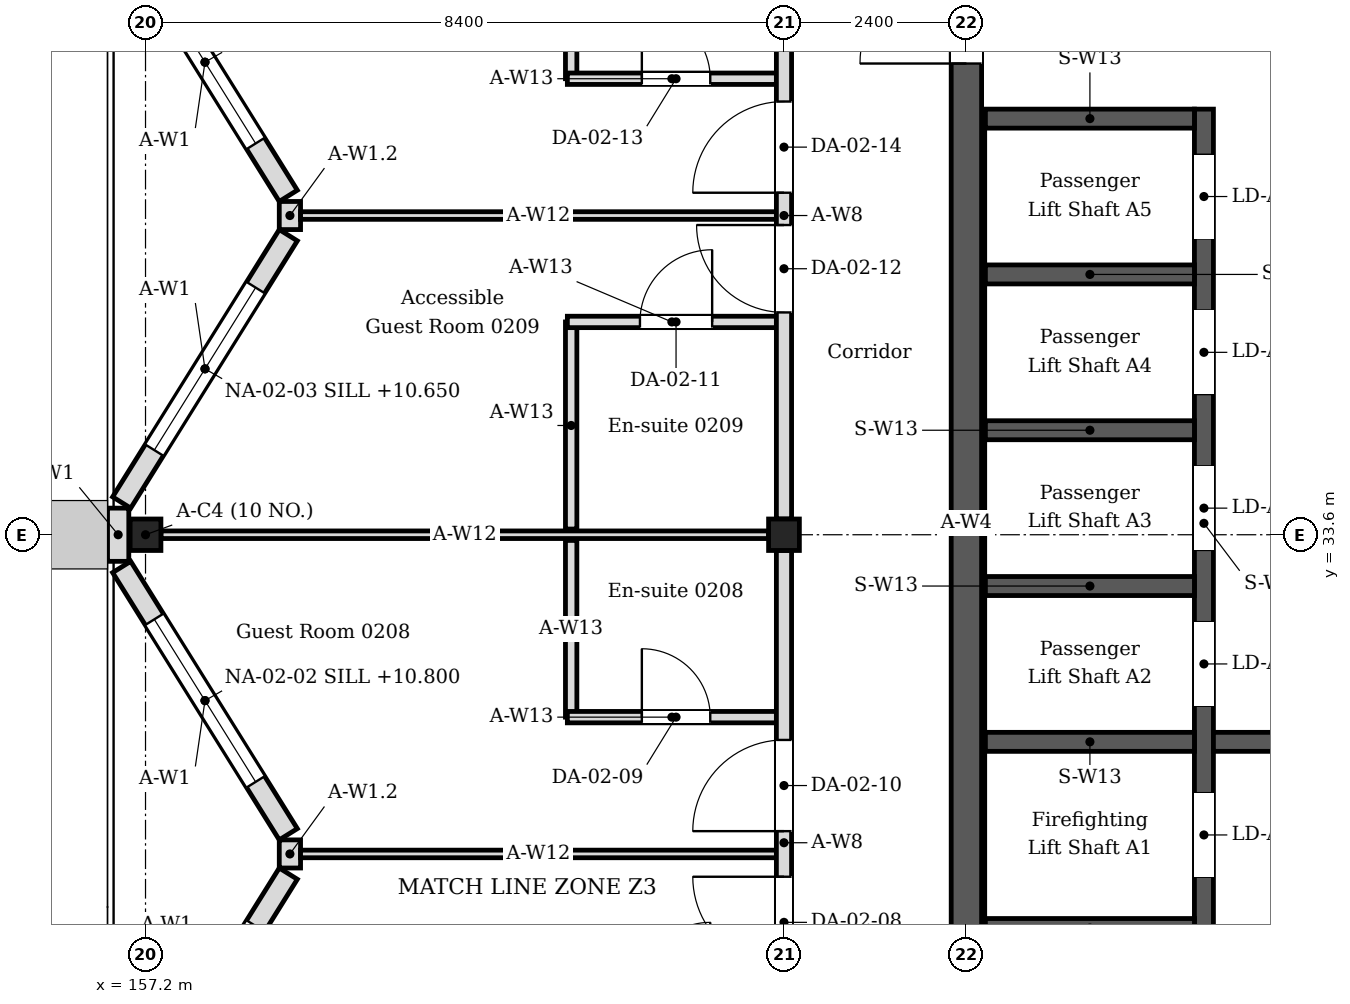
"""IFC4 building model, lengths in metres.
Left out: names, types, materials, properties, quantities, classifications, styles, units other than length and angle.
Written with IfcOpenShell. Run it as: python <this file> out.ifc"""

import sys

from ifc_helpers import new_model, si_unit, direction, frame, frame_2d, origin, origin_2d, place, context, subcontext, project, spatial, rectangle, i_section, extrude, element, fill, save


model = new_model("IFC4")
c1 = context("Model", 3, precision=1e-05, world=origin(), true_north=direction((0.0, 1.0)))
c2 = subcontext(c1, "Body", "Model", "MODEL_VIEW")
j1 = project(units=[si_unit("LENGTHUNIT", "METRE"), si_unit("PLANEANGLEUNIT", "RADIAN")], contexts=[c1])
p1 = place(None, origin())
s1 = spatial("IfcSite", under=j1, at=p1, CompositionType="ELEMENT")
p2 = place(p1, origin())
s2 = spatial("IfcBuilding", under=s1, at=p2, CompositionType="ELEMENT")
p3 = place(p2, frame((0.0, 0.0, 10.2)))
s3 = spatial("IfcBuildingStorey", under=s2, at=p3, CompositionType="ELEMENT", Elevation=10.2)
for number, where, z_axis, x_axis in (
    (1, (157.2, 33.6, 0.0), (0.0, 0.0, 1.0), (1.0, 0.0, 0.0)),
    (2, (165.6, 33.6, 0.0), (0.0, 0.0, 1.0), (1.0, 0.0, 0.0)),
):
    element("IfcColumn", number, at=place(p3, frame(where, z_axis=z_axis, x_axis=x_axis)), inside=s3, PredefinedType="COLUMN", context=c2, shape_type="SweptSolid", body=[
        extrude(i_section(OverallWidth=0.405, OverallDepth=0.414, WebThickness=0.018, FlangeThickness=0.028, FilletRadius=0.022, at=origin_2d()), origin(), (0.0, 0.0, 1.0), 4.2),
    ])
p4 = place(p3, frame((168.0, 25.4, 0.0), z_axis=(0.0, 0.0, 1.0), x_axis=(0.0, 1.0, 0.0)))
e3 = element("IfcWall", 3, at=p4, inside=s3, PredefinedType="SOLIDWALL", context=c2, shape_type="SweptSolid", body=[
    extrude(rectangle(XDim=16.4, YDim=0.4, at=frame_2d((8.2, 0.0))), origin(), (0.0, 0.0, 1.0), 4.05),
])
p5 = place(p4, frame((1.0, 0.0, 0.0)))
e4 = element("IfcOpeningElement", 4, at=p5, cuts=e3, PredefinedType="OPENING", context=c2, shape_type="SweptSolid", body=[
    extrude(rectangle(XDim=1.0, YDim=2.1, at=frame_2d((0.5, 1.05))), frame((0.0, 0.21, 0.0), z_axis=(0.0, -1.0, 0.0), x_axis=(1.0, 0.0, 0.0)), (0.0, 0.0, 1.0), 0.42),
])
p6 = place(p4, frame((14.4, 0.0, 0.0)))
e5 = element("IfcOpeningElement", 5, at=p6, cuts=e3, PredefinedType="OPENING", context=c2, shape_type="SweptSolid", body=[
    extrude(rectangle(XDim=1.4, YDim=2.1, at=frame_2d((0.7, 1.05))), frame((0.0, 0.21, 0.0), z_axis=(0.0, -1.0, 0.0), x_axis=(1.0, 0.0, 0.0)), (0.0, 0.0, 1.0), 0.42),
])
p7 = place(p3, frame((156.886, 25.624, 0.0), z_axis=(0.0, 0.0, 1.0), x_axis=(0.528992500338, 0.848626498871, 0.0)))
e6 = element("IfcWall", 6, at=p7, inside=s3, PredefinedType="SOLIDWALL", context=c2, shape_type="SweptSolid", body=[
    extrude(rectangle(XDim=4.145, YDim=0.28, at=frame_2d((2.072, 0.0))), origin(), (0.0, 0.0, 1.0), 4.05),
])
p8 = place(p7, frame((0.812, 0.0, 0.6)))
e7 = element("IfcOpeningElement", 7, at=p8, cuts=e6, PredefinedType="OPENING", context=c2, shape_type="SweptSolid", body=[
    extrude(rectangle(XDim=2.52, YDim=2.4, at=frame_2d((1.26, 1.2))), frame((0.0, 0.15, 0.0), z_axis=(0.0, -1.0, 0.0), x_axis=(1.0, 0.0, 0.0)), (0.0, 0.0, 1.0), 0.3),
])
p9 = place(p3, frame((159.079, 29.659, 0.0), z_axis=(0.0, 0.0, 1.0), x_axis=(-0.529018946142, 0.848610013271, 0.0)))
e8 = element("IfcWall", 8, at=p9, inside=s3, PredefinedType="SOLIDWALL", context=c2, shape_type="SweptSolid", body=[
    extrude(rectangle(XDim=4.144, YDim=0.28, at=frame_2d((2.072, 0.0))), origin(), (0.0, 0.0, 1.0), 4.05),
])
p10 = place(p9, frame((0.812, 0.0, 0.6)))
e9 = element("IfcOpeningElement", 9, at=p10, cuts=e8, PredefinedType="OPENING", context=c2, shape_type="SweptSolid", body=[
    extrude(rectangle(XDim=2.52, YDim=2.4, at=frame_2d((1.26, 1.2))), frame((0.0, 0.15, 0.0), z_axis=(0.0, -1.0, 0.0), x_axis=(1.0, 0.0, 0.0)), (0.0, 0.0, 1.0), 0.3),
])
p11 = place(p3, frame((159.1, 29.215, 0.0), z_axis=(0.0, 0.0, 1.0), x_axis=(0.0, 1.0, 0.0)))
e10 = element("IfcWall", 10, at=p11, inside=s3, PredefinedType="SOLIDWALL", context=c2, shape_type="SweptSolid", body=[
    extrude(rectangle(XDim=0.37, YDim=0.28, at=frame_2d((0.185, 0.0))), origin(), (0.0, 0.0, 1.0), 3.604),
])
p12 = place(p3, frame((156.84, 33.25, 0.0), z_axis=(0.0, 0.0, 1.0), x_axis=(0.0, 1.0, 0.0)))
e11 = element("IfcWall", 11, at=p12, inside=s3, PredefinedType="SOLIDWALL", context=c2, shape_type="SweptSolid", body=[
    extrude(rectangle(XDim=0.7, YDim=0.28, at=frame_2d((0.35, 0.0))), origin(), (0.0, 0.0, 1.0), 4.05),
])
p13 = place(p3, frame((156.886, 34.024, 0.0), z_axis=(0.0, 0.0, 1.0), x_axis=(0.529018946142, 0.848610013271, 0.0)))
e12 = element("IfcWall", 12, at=p13, inside=s3, PredefinedType="SOLIDWALL", context=c2, shape_type="SweptSolid", body=[
    extrude(rectangle(XDim=4.144, YDim=0.28, at=frame_2d((2.072, 0.0))), origin(), (0.0, 0.0, 1.0), 4.05),
])
p14 = place(p13, frame((0.812, 0.0, 0.45)))
e13 = element("IfcOpeningElement", 13, at=p14, cuts=e12, PredefinedType="OPENING", context=c2, shape_type="SweptSolid", body=[
    extrude(rectangle(XDim=2.52, YDim=2.1, at=frame_2d((1.26, 1.05))), frame((0.0, 0.15, 0.0), z_axis=(0.0, -1.0, 0.0), x_axis=(1.0, 0.0, 0.0)), (0.0, 0.0, 1.0), 0.3),
])
p15 = place(p3, frame((159.079, 38.059, 0.0), z_axis=(0.0, 0.0, 1.0), x_axis=(-0.529018946142, 0.848610013271, 0.0)))
e14 = element("IfcWall", 14, at=p15, inside=s3, PredefinedType="SOLIDWALL", context=c2, shape_type="SweptSolid", body=[
    extrude(rectangle(XDim=4.144, YDim=0.28, at=frame_2d((2.072, 0.0))), origin(), (0.0, 0.0, 1.0), 4.05),
])
p16 = place(p15, frame((0.812, 0.0, 0.6)))
e15 = element("IfcOpeningElement", 15, at=p16, cuts=e14, PredefinedType="OPENING", context=c2, shape_type="SweptSolid", body=[
    extrude(rectangle(XDim=2.52, YDim=2.4, at=frame_2d((1.26, 1.2))), frame((0.0, 0.15, 0.0), z_axis=(0.0, -1.0, 0.0), x_axis=(1.0, 0.0, 0.0)), (0.0, 0.0, 1.0), 0.3),
])
p17 = place(p3, frame((159.1, 37.615, 0.0), z_axis=(0.0, 0.0, 1.0), x_axis=(0.0, 1.0, 0.0)))
e16 = element("IfcWall", 16, at=p17, inside=s3, PredefinedType="SOLIDWALL", context=c2, shape_type="SweptSolid", body=[
    extrude(rectangle(XDim=0.37, YDim=0.28, at=frame_2d((0.185, 0.0))), origin(), (0.0, 0.0, 1.0), 3.604),
])
p18 = place(p3, frame((162.8, 31.2, 0.0), z_axis=(0.0, 0.0, 1.0), x_axis=(0.0, 1.0, 0.0)))
e17 = element("IfcWall", 17, at=p18, inside=s3, PredefinedType="PARTITIONING", context=c2, shape_type="SweptSolid", body=[
    extrude(rectangle(XDim=2.325, YDim=0.15, at=frame_2d((1.163, 0.0))), origin(), (0.0, 0.0, 1.0), 4.05),
])
p19 = place(p3, frame((162.75, 31.2, 0.0), z_axis=(0.0, 0.0, 1.0), x_axis=(1.0, 0.0, 0.0)))
e18 = element("IfcWall", 18, at=p19, inside=s3, PredefinedType="PARTITIONING", context=c2, shape_type="SweptSolid", body=[
    extrude(rectangle(XDim=2.75, YDim=0.15, at=frame_2d((1.375, 0.0))), origin(), (0.0, 0.0, 1.0), 4.05),
])
p20 = place(p19, frame((0.98, 0.0, 0.0)))
e19 = element("IfcOpeningElement", 19, at=p20, cuts=e18, PredefinedType="OPENING", context=c2, shape_type="SweptSolid", body=[
    extrude(rectangle(XDim=0.9, YDim=2.1, at=frame_2d((0.45, 1.05))), frame((0.0, 0.085, 0.0), z_axis=(0.0, -1.0, 0.0), x_axis=(1.0, 0.0, 0.0)), (0.0, 0.0, 1.0), 0.17),
])
p21 = place(p3, frame((162.8, 33.675, 0.0), z_axis=(0.0, 0.0, 1.0), x_axis=(0.0, 1.0, 0.0)))
e20 = element("IfcWall", 20, at=p21, inside=s3, PredefinedType="PARTITIONING", context=c2, shape_type="SweptSolid", body=[
    extrude(rectangle(XDim=2.725, YDim=0.15, at=frame_2d((1.362, 0.0))), origin(), (0.0, 0.0, 1.0), 4.05),
])
p22 = place(p3, frame((162.75, 36.4, 0.0), z_axis=(0.0, 0.0, 1.0), x_axis=(1.0, 0.0, 0.0)))
e21 = element("IfcWall", 21, at=p22, inside=s3, PredefinedType="PARTITIONING", context=c2, shape_type="SweptSolid", body=[
    extrude(rectangle(XDim=2.75, YDim=0.15, at=frame_2d((1.375, 0.0))), origin(), (0.0, 0.0, 1.0), 4.05),
])
p23 = place(p22, frame((0.955, 0.0, 0.0)))
e22 = element("IfcOpeningElement", 22, at=p23, cuts=e21, PredefinedType="OPENING", context=c2, shape_type="SweptSolid", body=[
    extrude(rectangle(XDim=0.95, YDim=2.1, at=frame_2d((0.475, 1.05))), frame((0.0, 0.085, 0.0), z_axis=(0.0, -1.0, 0.0), x_axis=(1.0, 0.0, 0.0)), (0.0, 0.0, 1.0), 0.17),
])
p24 = place(p3, frame((162.8, 39.6, 0.0), z_axis=(0.0, 0.0, 1.0), x_axis=(0.0, 1.0, 0.0)))
e23 = element("IfcWall", 23, at=p24, inside=s3, PredefinedType="PARTITIONING", context=c2, shape_type="SweptSolid", body=[
    extrude(rectangle(XDim=2.325, YDim=0.15, at=frame_2d((1.163, 0.0))), origin(), (0.0, 0.0, 1.0), 4.05),
])
p25 = place(p3, frame((162.75, 39.6, 0.0), z_axis=(0.0, 0.0, 1.0), x_axis=(1.0, 0.0, 0.0)))
e24 = element("IfcWall", 24, at=p25, inside=s3, PredefinedType="PARTITIONING", context=c2, shape_type="SweptSolid", body=[
    extrude(rectangle(XDim=2.75, YDim=0.15, at=frame_2d((1.375, 0.0))), origin(), (0.0, 0.0, 1.0), 4.05),
])
p26 = place(p25, frame((0.98, 0.0, 0.0)))
e25 = element("IfcOpeningElement", 25, at=p26, cuts=e24, PredefinedType="OPENING", context=c2, shape_type="SweptSolid", body=[
    extrude(rectangle(XDim=0.9, YDim=2.1, at=frame_2d((0.45, 1.05))), frame((0.0, 0.085, 0.0), z_axis=(0.0, -1.0, 0.0), x_axis=(1.0, 0.0, 0.0)), (0.0, 0.0, 1.0), 0.17),
])
p27 = place(p3, frame((157.403, 33.6, 0.0), z_axis=(0.0, 0.0, 1.0), x_axis=(1.0, 0.0, 0.0)))
e26 = element("IfcWall", 26, at=p27, inside=s3, PredefinedType="PARTITIONING", context=c2, shape_type="SweptSolid", body=[
    extrude(rectangle(XDim=7.995, YDim=0.1, at=frame_2d((3.998, 0.0))), origin(), (0.0, 0.0, 1.0), 3.604),
])
for number, where, z_axis, x_axis in (
    (27, (159.24, 29.4, 0.0), (0.0, 0.0, 1.0), (1.0, 0.0, 0.0)),
    (28, (159.24, 37.8, 0.0), (0.0, 0.0, 1.0), (1.0, 0.0, 0.0)),
):
    element("IfcWall", number, at=place(p3, frame(where, z_axis=z_axis, x_axis=x_axis)), inside=s3, PredefinedType="PARTITIONING", context=c2, shape_type="SweptSolid", body=[
        extrude(rectangle(XDim=6.26, YDim=0.1, at=frame_2d((3.13, 0.0))), origin(), (0.0, 0.0, 1.0), 3.604),
    ])
p28 = place(p3, frame((165.6, 25.407, 0.0), z_axis=(0.0, 0.0, 1.0), x_axis=(0.0, 1.0, 0.0)))
e29 = element("IfcWall", 29, at=p28, inside=s3, PredefinedType="PARTITIONING", context=c2, shape_type="SweptSolid", body=[
    extrude(rectangle(XDim=7.986, YDim=0.2, at=frame_2d((3.993, 0.0))), origin(), (0.0, 0.0, 1.0), 3.45),
])
p29 = place(p28, frame((2.493, 0.0, 0.0)))
e30 = element("IfcOpeningElement", 30, at=p29, cuts=e29, PredefinedType="OPENING", context=c2, shape_type="SweptSolid", body=[
    extrude(rectangle(XDim=1.2, YDim=2.1, at=frame_2d((0.6, 1.05))), frame((0.0, 0.11, 0.0), z_axis=(0.0, -1.0, 0.0), x_axis=(1.0, 0.0, 0.0)), (0.0, 0.0, 1.0), 0.22),
])
p30 = place(p28, frame((4.293, 0.0, 0.0)))
e31 = element("IfcOpeningElement", 31, at=p30, cuts=e29, PredefinedType="OPENING", context=c2, shape_type="SweptSolid", body=[
    extrude(rectangle(XDim=1.2, YDim=2.1, at=frame_2d((0.6, 1.05))), frame((0.0, 0.11, 0.0), z_axis=(0.0, -1.0, 0.0), x_axis=(1.0, 0.0, 0.0)), (0.0, 0.0, 1.0), 0.22),
])
p31 = place(p3, frame((165.6, 33.807, 0.0), z_axis=(0.0, 0.0, 1.0), x_axis=(0.0, 1.0, 0.0)))
e32 = element("IfcWall", 32, at=p31, inside=s3, PredefinedType="PARTITIONING", context=c2, shape_type="SweptSolid", body=[
    extrude(rectangle(XDim=7.986, YDim=0.2, at=frame_2d((3.993, 0.0))), origin(), (0.0, 0.0, 1.0), 3.45),
])
p32 = place(p31, frame((2.718, 0.0, 0.0)))
e33 = element("IfcOpeningElement", 33, at=p32, cuts=e32, PredefinedType="OPENING", context=c2, shape_type="SweptSolid", body=[
    extrude(rectangle(XDim=1.15, YDim=2.1, at=frame_2d((0.575, 1.05))), frame((0.0, 0.11, 0.0), z_axis=(0.0, -1.0, 0.0), x_axis=(1.0, 0.0, 0.0)), (0.0, 0.0, 1.0), 0.22),
])
p33 = place(p31, frame((4.293, 0.0, 0.0)))
e34 = element("IfcOpeningElement", 34, at=p33, cuts=e32, PredefinedType="OPENING", context=c2, shape_type="SweptSolid", body=[
    extrude(rectangle(XDim=1.2, YDim=2.1, at=frame_2d((0.6, 1.05))), frame((0.0, 0.11, 0.0), z_axis=(0.0, -1.0, 0.0), x_axis=(1.0, 0.0, 0.0)), (0.0, 0.0, 1.0), 0.22),
])
p34 = place(p3, frame((171.125, 28.3, 0.0), z_axis=(0.0, 0.0, 1.0), x_axis=(0.0, 1.0, 0.0)))
e35 = element("IfcWall", 35, at=p34, inside=s3, PredefinedType="SOLIDWALL", context=c2, shape_type="SweptSolid", body=[
    extrude(rectangle(XDim=10.9, YDim=0.25, at=frame_2d((5.45, 0.0))), origin(), (0.0, 0.0, 1.0), 4.05),
])
p35 = place(p34, frame((0.8, 0.0, 0.0)))
e36 = element("IfcOpeningElement", 36, at=p35, cuts=e35, PredefinedType="OPENING", context=c2, shape_type="SweptSolid", body=[
    extrude(rectangle(XDim=1.1, YDim=2.1, at=frame_2d((0.55, 1.05))), frame((0.0, 0.135, 0.0), z_axis=(0.0, -1.0, 0.0), x_axis=(1.0, 0.0, 0.0)), (0.0, 0.0, 1.0), 0.27),
])
p36 = place(p34, frame((3.05, 0.0, 0.0)))
e37 = element("IfcOpeningElement", 37, at=p36, cuts=e35, PredefinedType="OPENING", context=c2, shape_type="SweptSolid", body=[
    extrude(rectangle(XDim=1.1, YDim=2.1, at=frame_2d((0.55, 1.05))), frame((0.0, 0.135, 0.0), z_axis=(0.0, -1.0, 0.0), x_axis=(1.0, 0.0, 0.0)), (0.0, 0.0, 1.0), 0.27),
])
p37 = place(p34, frame((5.1, 0.0, 0.0)))
e38 = element("IfcOpeningElement", 38, at=p37, cuts=e35, PredefinedType="OPENING", context=c2, shape_type="SweptSolid", body=[
    extrude(rectangle(XDim=1.1, YDim=2.1, at=frame_2d((0.55, 1.05))), frame((0.0, 0.135, 0.0), z_axis=(0.0, -1.0, 0.0), x_axis=(1.0, 0.0, 0.0)), (0.0, 0.0, 1.0), 0.27),
])
p38 = place(p34, frame((7.15, 0.0, 0.0)))
e39 = element("IfcOpeningElement", 39, at=p38, cuts=e35, PredefinedType="OPENING", context=c2, shape_type="SweptSolid", body=[
    extrude(rectangle(XDim=1.1, YDim=2.1, at=frame_2d((0.55, 1.05))), frame((0.0, 0.135, 0.0), z_axis=(0.0, -1.0, 0.0), x_axis=(1.0, 0.0, 0.0)), (0.0, 0.0, 1.0), 0.27),
])
p39 = place(p34, frame((9.2, 0.0, 0.0)))
e40 = element("IfcOpeningElement", 40, at=p39, cuts=e35, PredefinedType="OPENING", context=c2, shape_type="SweptSolid", body=[
    extrude(rectangle(XDim=1.1, YDim=2.1, at=frame_2d((0.55, 1.05))), frame((0.0, 0.135, 0.0), z_axis=(0.0, -1.0, 0.0), x_axis=(1.0, 0.0, 0.0)), (0.0, 0.0, 1.0), 0.27),
])
for number, where, z_axis, x_axis in (
    (41, (168.25, 28.425, 0.0), (0.0, 0.0, 1.0), (1.0, 0.0, 0.0)),
    (42, (168.25, 30.875, 0.0), (0.0, 0.0, 1.0), (1.0, 0.0, 0.0)),
    (43, (168.25, 32.925, 0.0), (0.0, 0.0, 1.0), (1.0, 0.0, 0.0)),
    (44, (168.25, 34.975, 0.0), (0.0, 0.0, 1.0), (1.0, 0.0, 0.0)),
    (45, (168.25, 37.025, 0.0), (0.0, 0.0, 1.0), (1.0, 0.0, 0.0)),
    (46, (168.25, 39.075, 0.0), (0.0, 0.0, 1.0), (1.0, 0.0, 0.0)),
):
    element("IfcWall", number, at=place(p3, frame(where, z_axis=z_axis, x_axis=x_axis)), inside=s3, PredefinedType="SOLIDWALL", context=c2, shape_type="SweptSolid", body=[
        extrude(rectangle(XDim=2.75, YDim=0.25, at=frame_2d((1.375, 0.0))), origin(), (0.0, 0.0, 1.0), 4.05),
    ])
p40 = place(p3, frame((171.25, 30.875, 0.0), z_axis=(0.0, 0.0, 1.0), x_axis=(1.0, 0.0, 0.0)))
e47 = element("IfcWall", 47, at=p40, inside=s3, PredefinedType="SOLIDWALL", context=c2, shape_type="SweptSolid", body=[
    extrude(rectangle(XDim=4.9, YDim=0.25, at=frame_2d((2.45, 0.0))), origin(), (0.0, 0.0, 1.0), 4.05),
])
p41 = place(p10, origin())
e48 = element("IfcWindow", 48, at=p41, inside=s3, PartitioningType="SINGLE_PANEL", PredefinedType="WINDOW", context=c2, shape_type="SweptSolid", body=[
    extrude(rectangle(XDim=2.52, YDim=2.4, at=frame_2d((1.26, 1.2))), frame((0.0, 0.03, 0.0), z_axis=(0.0, -1.0, 0.0), x_axis=(1.0, 0.0, 0.0)), (0.0, 0.0, 1.0), 0.06),
])
fill(e9, e48)
p42 = place(p14, origin())
e49 = element("IfcWindow", 49, at=p42, inside=s3, PartitioningType="SINGLE_PANEL", PredefinedType="WINDOW", context=c2, shape_type="SweptSolid", body=[
    extrude(rectangle(XDim=2.52, YDim=2.1, at=frame_2d((1.26, 1.05))), frame((0.0, 0.03, 0.0), z_axis=(0.0, -1.0, 0.0), x_axis=(1.0, 0.0, 0.0)), (0.0, 0.0, 1.0), 0.06),
])
fill(e13, e49)
p43 = place(p16, origin())
e50 = element("IfcWindow", 50, at=p43, inside=s3, PartitioningType="SINGLE_PANEL", PredefinedType="WINDOW", context=c2, shape_type="SweptSolid", body=[
    extrude(rectangle(XDim=2.52, YDim=2.4, at=frame_2d((1.26, 1.2))), frame((0.0, 0.03, 0.0), z_axis=(0.0, -1.0, 0.0), x_axis=(1.0, 0.0, 0.0)), (0.0, 0.0, 1.0), 0.06),
])
fill(e15, e50)
p44 = place(p29, origin())
e51 = element("IfcDoor", 51, at=p44, inside=s3, OperationType="SINGLE_SWING_RIGHT", PredefinedType="DOOR", context=c2, shape_type="SweptSolid", body=[
    extrude(rectangle(XDim=1.2, YDim=2.1, at=frame_2d((0.6, 1.05))), frame((0.0, 0.025, 0.0), z_axis=(0.0, -1.0, 0.0), x_axis=(1.0, 0.0, 0.0)), (0.0, 0.0, 1.0), 0.05),
])
fill(e30, e51)
p45 = place(p20, origin())
e52 = element("IfcDoor", 52, at=p45, inside=s3, OperationType="SINGLE_SWING_LEFT", PredefinedType="DOOR", context=c2, shape_type="SweptSolid", body=[
    extrude(rectangle(XDim=0.9, YDim=2.1, at=frame_2d((0.45, 1.05))), frame((0.0, 0.025, 0.0), z_axis=(0.0, -1.0, 0.0), x_axis=(1.0, 0.0, 0.0)), (0.0, 0.0, 1.0), 0.05),
])
fill(e19, e52)
p46 = place(p30, origin())
e53 = element("IfcDoor", 53, at=p46, inside=s3, OperationType="SINGLE_SWING_LEFT", PredefinedType="DOOR", context=c2, shape_type="SweptSolid", body=[
    extrude(rectangle(XDim=1.2, YDim=2.1, at=frame_2d((0.6, 1.05))), frame((0.0, 0.025, 0.0), z_axis=(0.0, -1.0, 0.0), x_axis=(1.0, 0.0, 0.0)), (0.0, 0.0, 1.0), 0.05),
])
fill(e31, e53)
p47 = place(p23, origin())
e54 = element("IfcDoor", 54, at=p47, inside=s3, OperationType="SINGLE_SWING_RIGHT", PredefinedType="DOOR", context=c2, shape_type="SweptSolid", body=[
    extrude(rectangle(XDim=0.95, YDim=2.1, at=frame_2d((0.475, 1.05))), frame((0.0, 0.025, 0.0), z_axis=(0.0, -1.0, 0.0), x_axis=(1.0, 0.0, 0.0)), (0.0, 0.0, 1.0), 0.05),
])
fill(e22, e54)
p48 = place(p32, origin())
e55 = element("IfcDoor", 55, at=p48, inside=s3, OperationType="SINGLE_SWING_RIGHT", PredefinedType="DOOR", context=c2, shape_type="SweptSolid", body=[
    extrude(rectangle(XDim=1.15, YDim=2.1, at=frame_2d((0.575, 1.05))), frame((0.0, 0.025, 0.0), z_axis=(0.0, -1.0, 0.0), x_axis=(1.0, 0.0, 0.0)), (0.0, 0.0, 1.0), 0.05),
])
fill(e33, e55)
p49 = place(p26, origin())
e56 = element("IfcDoor", 56, at=p49, inside=s3, OperationType="SINGLE_SWING_LEFT", PredefinedType="DOOR", context=c2, shape_type="SweptSolid", body=[
    extrude(rectangle(XDim=0.9, YDim=2.1, at=frame_2d((0.45, 1.05))), frame((0.0, 0.025, 0.0), z_axis=(0.0, -1.0, 0.0), x_axis=(1.0, 0.0, 0.0)), (0.0, 0.0, 1.0), 0.05),
])
fill(e25, e56)
p50 = place(p33, origin())
e57 = element("IfcDoor", 57, at=p50, inside=s3, OperationType="SINGLE_SWING_LEFT", PredefinedType="DOOR", context=c2, shape_type="SweptSolid", body=[
    extrude(rectangle(XDim=1.2, YDim=2.1, at=frame_2d((0.6, 1.05))), frame((0.0, 0.025, 0.0), z_axis=(0.0, -1.0, 0.0), x_axis=(1.0, 0.0, 0.0)), (0.0, 0.0, 1.0), 0.05),
])
fill(e34, e57)
p51 = place(p35, origin())
e58 = element("IfcDoor", 58, at=p51, inside=s3, OperationType="SLIDING_TO_LEFT", PredefinedType="DOOR", context=c2, shape_type="SweptSolid", body=[
    extrude(rectangle(XDim=1.1, YDim=2.1, at=frame_2d((0.55, 1.05))), frame((0.0, 0.025, 0.0), z_axis=(0.0, -1.0, 0.0), x_axis=(1.0, 0.0, 0.0)), (0.0, 0.0, 1.0), 0.05),
])
fill(e36, e58)
p52 = place(p36, origin())
e59 = element("IfcDoor", 59, at=p52, inside=s3, OperationType="SLIDING_TO_LEFT", PredefinedType="DOOR", context=c2, shape_type="SweptSolid", body=[
    extrude(rectangle(XDim=1.1, YDim=2.1, at=frame_2d((0.55, 1.05))), frame((0.0, 0.025, 0.0), z_axis=(0.0, -1.0, 0.0), x_axis=(1.0, 0.0, 0.0)), (0.0, 0.0, 1.0), 0.05),
])
fill(e37, e59)
p53 = place(p37, origin())
e60 = element("IfcDoor", 60, at=p53, inside=s3, OperationType="SLIDING_TO_LEFT", PredefinedType="DOOR", context=c2, shape_type="SweptSolid", body=[
    extrude(rectangle(XDim=1.1, YDim=2.1, at=frame_2d((0.55, 1.05))), frame((0.0, 0.025, 0.0), z_axis=(0.0, -1.0, 0.0), x_axis=(1.0, 0.0, 0.0)), (0.0, 0.0, 1.0), 0.05),
])
fill(e38, e60)
p54 = place(p38, origin())
e61 = element("IfcDoor", 61, at=p54, inside=s3, OperationType="SLIDING_TO_LEFT", PredefinedType="DOOR", context=c2, shape_type="SweptSolid", body=[
    extrude(rectangle(XDim=1.1, YDim=2.1, at=frame_2d((0.55, 1.05))), frame((0.0, 0.025, 0.0), z_axis=(0.0, -1.0, 0.0), x_axis=(1.0, 0.0, 0.0)), (0.0, 0.0, 1.0), 0.05),
])
fill(e39, e61)
p55 = place(p39, origin())
e62 = element("IfcDoor", 62, at=p55, inside=s3, OperationType="SLIDING_TO_LEFT", PredefinedType="DOOR", context=c2, shape_type="SweptSolid", body=[
    extrude(rectangle(XDim=1.1, YDim=2.1, at=frame_2d((0.55, 1.05))), frame((0.0, 0.025, 0.0), z_axis=(0.0, -1.0, 0.0), x_axis=(1.0, 0.0, 0.0)), (0.0, 0.0, 1.0), 0.05),
])
fill(e40, e62)
p56 = place(p6, origin())
e63 = element("IfcDoor", 63, at=p56, inside=s3, OperationType="DOUBLE_DOOR_DOUBLE_SWING", PredefinedType="DOOR", context=c2, shape_type="SweptSolid", body=[
    extrude(rectangle(XDim=1.4, YDim=2.1, at=frame_2d((0.7, 1.05))), frame((0.0, 0.025, 0.0), z_axis=(0.0, -1.0, 0.0), x_axis=(1.0, 0.0, 0.0)), (0.0, 0.0, 1.0), 0.05),
])
fill(e5, e63)
save(model, sys.argv[1])
